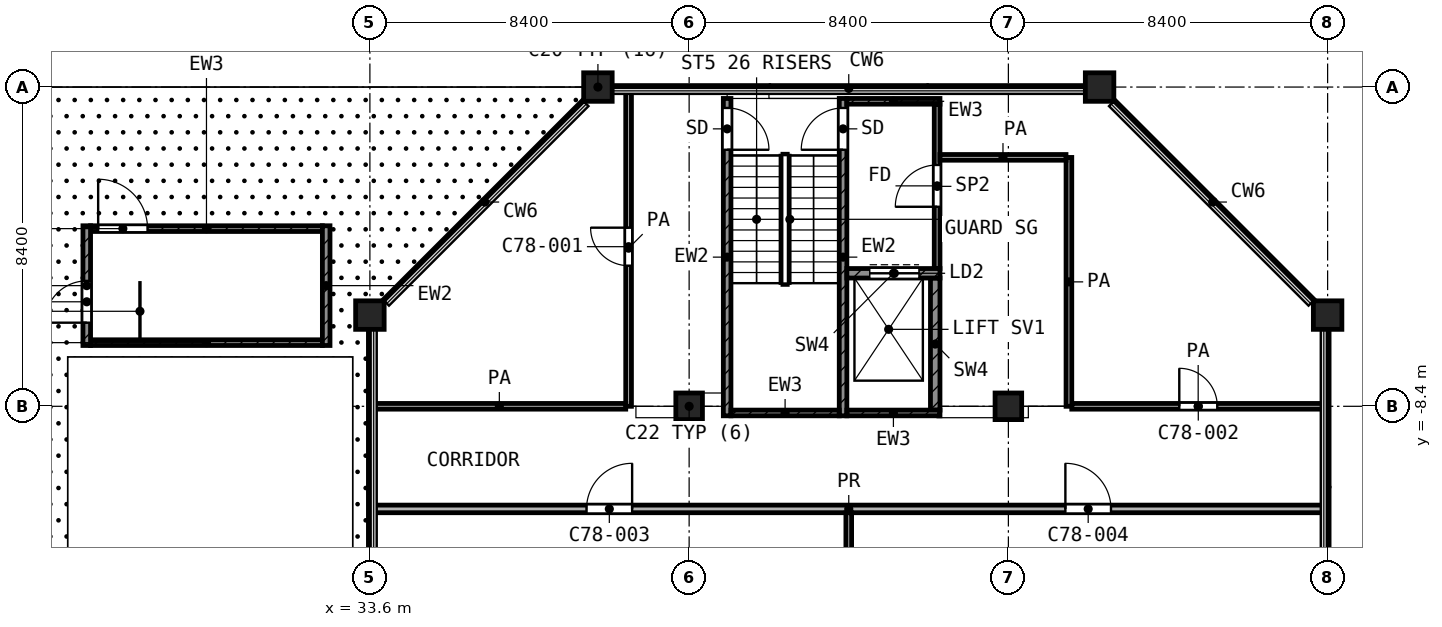
"""IFC4 building model, lengths in metres.
Left out: names, types, materials, properties, quantities, classifications, styles, units other than length and angle.
Written with IfcOpenShell. Run it as: python <this file> out.ifc"""

import sys

from ifc_helpers import new_model, si_unit, direction, frame, frame_2d, origin, origin_2d, place, context, subcontext, project, spatial, rectangle, extrude, element, fill, save


model = new_model("IFC4")
c1 = context("Model", 3, precision=1e-05, world=origin(), true_north=direction((0.0, 1.0)))
c2 = subcontext(c1, "Body", "Model", "MODEL_VIEW")
j1 = project(units=[si_unit("LENGTHUNIT", "METRE"), si_unit("PLANEANGLEUNIT", "RADIAN")], contexts=[c1])
p1 = place(None, origin())
s1 = spatial("IfcSite", under=j1, at=p1, CompositionType="ELEMENT")
p2 = place(p1, origin())
s2 = spatial("IfcBuilding", under=s1, at=p2, CompositionType="ELEMENT")
p3 = place(p2, frame((0.0, 0.0, 336.7)))
s3 = spatial("IfcBuildingStorey", under=s2, at=p3, CompositionType="ELEMENT", Elevation=336.7)
for number, where, z_axis, x_axis in (
    (1, (39.6, 0.0, 0.0), (0.0, 0.0, 1.0), (1.0, 0.0, 0.0)),
    (2, (52.8, 0.0, 0.0), (0.0, 0.0, 1.0), (1.0, 0.0, 0.0)),
    (3, (33.6, -6.0, 0.0), (0.0, 0.0, 1.0), (1.0, 0.0, 0.0)),
    (4, (58.8, -6.0, 0.0), (0.0, 0.0, 1.0), (1.0, 0.0, 0.0)),
):
    element("IfcColumn", number, at=place(p3, frame(where, z_axis=z_axis, x_axis=x_axis)), inside=s3, PredefinedType="COLUMN", context=c2, shape_type="SweptSolid", body=[
        extrude(rectangle(XDim=0.75, YDim=0.75, at=origin_2d()), origin(), (0.0, 0.0, 1.0), 4.5),
    ])
for number, where, z_axis, x_axis in (
    (5, (42.0, -8.4, 0.0), (0.0, 0.0, 1.0), (1.0, 0.0, 0.0)),
    (6, (50.4, -8.4, 0.0), (0.0, 0.0, 1.0), (1.0, 0.0, 0.0)),
):
    element("IfcColumn", number, at=place(p3, frame(where, z_axis=z_axis, x_axis=x_axis)), inside=s3, PredefinedType="COLUMN", context=c2, shape_type="SweptSolid", body=[
        extrude(rectangle(XDim=0.7, YDim=0.7, at=origin_2d()), origin(), (0.0, 0.0, 1.0), 4.5),
    ])
p4 = place(p3, frame((43.0, -8.65, 0.0), z_axis=(0.0, 0.0, 1.0), x_axis=(0.0, 1.0, 0.0)))
e7 = element("IfcWall", 7, at=p4, inside=s3, PredefinedType="SHEAR", context=c2, shape_type="SweptSolid", body=[
    extrude(rectangle(XDim=8.35, YDim=0.2, at=frame_2d((4.175, 0.0))), origin(), (0.0, 0.0, 1.0), 4.2),
])
p5 = place(p4, frame((7.0, 0.0, 0.0)))
e8 = element("IfcOpeningElement", 8, at=p5, cuts=e7, PredefinedType="OPENING", context=c2, shape_type="SweptSolid", body=[
    extrude(rectangle(XDim=1.1, YDim=2.1, at=frame_2d((0.55, 1.05))), frame((0.0, 0.11, 0.0), z_axis=(0.0, -1.0, 0.0), x_axis=(1.0, 0.0, 0.0)), (0.0, 0.0, 1.0), 0.22),
])
p6 = place(p3, frame((46.05, -8.65, 0.0), z_axis=(0.0, 0.0, 1.0), x_axis=(0.0, 1.0, 0.0)))
e9 = element("IfcWall", 9, at=p6, inside=s3, PredefinedType="SHEAR", context=c2, shape_type="SweptSolid", body=[
    extrude(rectangle(XDim=8.35, YDim=0.2, at=frame_2d((4.175, 0.0))), origin(), (0.0, 0.0, 1.0), 4.2),
])
p7 = place(p6, frame((7.0, 0.0, 0.0)))
e10 = element("IfcOpeningElement", 10, at=p7, cuts=e9, PredefinedType="OPENING", context=c2, shape_type="SweptSolid", body=[
    extrude(rectangle(XDim=1.1, YDim=2.1, at=frame_2d((0.55, 1.05))), frame((0.0, 0.11, 0.0), z_axis=(0.0, -1.0, 0.0), x_axis=(1.0, 0.0, 0.0)), (0.0, 0.0, 1.0), 0.22),
])
p8 = place(p3, frame((46.15, -0.375, 0.0), z_axis=(0.0, 0.0, 1.0), x_axis=(1.0, 0.0, 0.0)))
e11 = element("IfcWall", 11, at=p8, inside=s3, PredefinedType="SHEAR", context=c2, shape_type="SweptSolid", body=[
    extrude(rectangle(XDim=2.45, YDim=0.15, at=frame_2d((1.225, 0.0))), origin(), (0.0, 0.0, 1.0), 4.2),
])
p9 = place(p3, frame((43.1, -8.575, 0.0), z_axis=(0.0, 0.0, 1.0), x_axis=(1.0, 0.0, 0.0)))
e12 = element("IfcWall", 12, at=p9, inside=s3, PredefinedType="SHEAR", context=c2, shape_type="SweptSolid", body=[
    extrude(rectangle(XDim=2.85, YDim=0.15, at=frame_2d((1.425, 0.0))), origin(), (0.0, 0.0, 1.0), 4.2),
])
p10 = place(p3, frame((46.15, -8.575, 0.0), z_axis=(0.0, 0.0, 1.0), x_axis=(1.0, 0.0, 0.0)))
e13 = element("IfcWall", 13, at=p10, inside=s3, PredefinedType="SHEAR", context=c2, shape_type="SweptSolid", body=[
    extrude(rectangle(XDim=2.45, YDim=0.15, at=frame_2d((1.225, 0.0))), origin(), (0.0, 0.0, 1.0), 4.2),
])
p11 = place(p3, frame((46.15, -4.9, 0.0), z_axis=(0.0, 0.0, 1.0), x_axis=(1.0, 0.0, 0.0)))
e14 = element("IfcWall", 14, at=p11, inside=s3, PredefinedType="SHEAR", context=c2, shape_type="SweptSolid", body=[
    extrude(rectangle(XDim=2.45, YDim=0.25, at=frame_2d((1.225, 0.0))), origin(), (0.0, 0.0, 1.0), 4.2),
])
p12 = place(p11, frame((0.6, 0.0, 0.0)))
e15 = element("IfcOpeningElement", 15, at=p12, cuts=e14, PredefinedType="OPENING", context=c2, shape_type="SweptSolid", body=[
    extrude(rectangle(XDim=1.3, YDim=2.1, at=frame_2d((0.65, 1.05))), frame((0.0, 0.135, 0.0), z_axis=(0.0, -1.0, 0.0), x_axis=(1.0, 0.0, 0.0)), (0.0, 0.0, 1.0), 0.27),
])
p13 = place(p3, frame((48.475, -8.5, 0.0), z_axis=(0.0, 0.0, 1.0), x_axis=(0.0, 1.0, 0.0)))
e16 = element("IfcWall", 16, at=p13, inside=s3, PredefinedType="SHEAR", context=c2, shape_type="SweptSolid", body=[
    extrude(rectangle(XDim=3.475, YDim=0.25, at=frame_2d((1.738, 0.0))), origin(), (0.0, 0.0, 1.0), 4.2),
])
p14 = place(p3, frame((48.525, -4.775, 0.0), z_axis=(0.0, 0.0, 1.0), x_axis=(0.0, 1.0, 0.0)))
e17 = element("IfcWall", 17, at=p14, inside=s3, PredefinedType="PARTITIONING", context=c2, shape_type="SweptSolid", body=[
    extrude(rectangle(XDim=4.325, YDim=0.15, at=frame_2d((2.163, 0.0))), origin(), (0.0, 0.0, 1.0), 4.2),
])
p15 = place(p14, frame((1.625, 0.0, 0.0)))
e18 = element("IfcOpeningElement", 18, at=p15, cuts=e17, PredefinedType="OPENING", context=c2, shape_type="SweptSolid", body=[
    extrude(rectangle(XDim=1.1, YDim=2.1, at=frame_2d((0.55, 1.05))), frame((0.0, 0.085, 0.0), z_axis=(0.0, -1.0, 0.0), x_axis=(1.0, 0.0, 0.0)), (0.0, 0.0, 1.0), 0.17),
])
p16 = place(p3, frame((26.15, -6.8, 0.0), z_axis=(0.0, 0.0, 1.0), x_axis=(0.0, 1.0, 0.0)))
e19 = element("IfcWall", 19, at=p16, inside=s3, PredefinedType="SHEAR", context=c2, shape_type="SweptSolid", body=[
    extrude(rectangle(XDim=3.15, YDim=0.2, at=frame_2d((1.575, 0.0))), origin(), (0.0, 0.0, 1.0), 4.2),
])
p17 = place(p16, frame((0.6, 0.0, 0.0)))
e20 = element("IfcOpeningElement", 20, at=p17, cuts=e19, PredefinedType="OPENING", context=c2, shape_type="SweptSolid", body=[
    extrude(rectangle(XDim=1.1, YDim=2.1, at=frame_2d((0.55, 1.05))), frame((0.0, 0.11, 0.0), z_axis=(0.0, -1.0, 0.0), x_axis=(1.0, 0.0, 0.0)), (0.0, 0.0, 1.0), 0.22),
])
p18 = place(p3, frame((32.45, -6.8, 0.0), z_axis=(0.0, 0.0, 1.0), x_axis=(0.0, 1.0, 0.0)))
e21 = element("IfcWall", 21, at=p18, inside=s3, PredefinedType="SHEAR", context=c2, shape_type="SweptSolid", body=[
    extrude(rectangle(XDim=3.15, YDim=0.2, at=frame_2d((1.575, 0.0))), origin(), (0.0, 0.0, 1.0), 4.2),
])
p19 = place(p3, frame((26.25, -3.725, 0.0), z_axis=(0.0, 0.0, 1.0), x_axis=(1.0, 0.0, 0.0)))
e22 = element("IfcWall", 22, at=p19, inside=s3, PredefinedType="SHEAR", context=c2, shape_type="SweptSolid", body=[
    extrude(rectangle(XDim=6.1, YDim=0.15, at=frame_2d((3.05, 0.0))), origin(), (0.0, 0.0, 1.0), 4.2),
])
p20 = place(p19, frame((0.2, 0.0, 0.0)))
e23 = element("IfcOpeningElement", 23, at=p20, cuts=e22, PredefinedType="OPENING", context=c2, shape_type="SweptSolid", body=[
    extrude(rectangle(XDim=1.3, YDim=2.1, at=frame_2d((0.65, 1.05))), frame((0.0, 0.085, 0.0), z_axis=(0.0, -1.0, 0.0), x_axis=(1.0, 0.0, 0.0)), (0.0, 0.0, 1.0), 0.17),
])
p21 = place(p3, frame((26.25, -6.725, 0.0), z_axis=(0.0, 0.0, 1.0), x_axis=(1.0, 0.0, 0.0)))
e24 = element("IfcWall", 24, at=p21, inside=s3, PredefinedType="SHEAR", context=c2, shape_type="SweptSolid", body=[
    extrude(rectangle(XDim=6.1, YDim=0.15, at=frame_2d((3.05, 0.0))), origin(), (0.0, 0.0, 1.0), 4.2),
])
p22 = place(p3, frame((33.68, -8.4, 0.0), z_axis=(0.0, 0.0, 1.0), x_axis=(1.0, 0.0, 0.0)))
e25 = element("IfcWall", 25, at=p22, inside=s3, PredefinedType="PARTITIONING", context=c2, shape_type="SweptSolid", body=[
    extrude(rectangle(XDim=6.652, YDim=0.15, at=frame_2d((3.326, 0.0))), origin(), (0.0, 0.0, 1.0), 4.2),
])
p23 = place(p3, frame((52.068, -8.4, 0.0), z_axis=(0.0, 0.0, 1.0), x_axis=(1.0, 0.0, 0.0)))
e26 = element("IfcWall", 26, at=p23, inside=s3, PredefinedType="PARTITIONING", context=c2, shape_type="SweptSolid", body=[
    extrude(rectangle(XDim=6.652, YDim=0.15, at=frame_2d((3.326, 0.0))), origin(), (0.0, 0.0, 1.0), 4.2),
])
p24 = place(p23, frame((2.829, 0.0, 0.0)))
e27 = element("IfcOpeningElement", 27, at=p24, cuts=e26, PredefinedType="OPENING", context=c2, shape_type="SweptSolid", body=[
    extrude(rectangle(XDim=1.0, YDim=2.1, at=frame_2d((0.5, 1.05))), frame((0.0, 0.085, 0.0), z_axis=(0.0, -1.0, 0.0), x_axis=(1.0, 0.0, 0.0)), (0.0, 0.0, 1.0), 0.17),
])
p25 = place(p3, frame((48.6, -1.85, 0.0), z_axis=(0.0, 0.0, 1.0), x_axis=(1.0, 0.0, 0.0)))
e28 = element("IfcWall", 28, at=p25, inside=s3, PredefinedType="PARTITIONING", context=c2, shape_type="SweptSolid", body=[
    extrude(rectangle(XDim=3.316, YDim=0.15, at=frame_2d((1.658, 0.0))), origin(), (0.0, 0.0, 1.0), 4.2),
])
p26 = place(p3, frame((40.407, -8.4, 0.0), z_axis=(0.0, 0.0, 1.0), x_axis=(0.0, 1.0, 0.0)))
e29 = element("IfcWall", 29, at=p26, inside=s3, PredefinedType="PARTITIONING", context=c2, shape_type="SweptSolid", body=[
    extrude(rectangle(XDim=8.32, YDim=0.15, at=frame_2d((4.16, 0.0))), origin(), (0.0, 0.0, 1.0), 4.2),
])
p27 = place(p26, frame((3.7, 0.0, 0.0)))
e30 = element("IfcOpeningElement", 30, at=p27, cuts=e29, PredefinedType="OPENING", context=c2, shape_type="SweptSolid", body=[
    extrude(rectangle(XDim=1.0, YDim=2.1, at=frame_2d((0.5, 1.05))), frame((0.0, 0.085, 0.0), z_axis=(0.0, -1.0, 0.0), x_axis=(1.0, 0.0, 0.0)), (0.0, 0.0, 1.0), 0.17),
])
p28 = place(p3, frame((46.2, -16.549, 0.0), z_axis=(0.0, 0.0, 1.0), x_axis=(0.0, 1.0, 0.0)))
e31 = element("IfcWall", 31, at=p28, inside=s3, PredefinedType="PARTITIONING", context=c2, shape_type="SweptSolid", body=[
    extrude(rectangle(XDim=5.349, YDim=0.15, at=frame_2d((2.675, 0.0))), origin(), (0.0, 0.0, 1.0), 4.2),
])
p29 = place(p3, frame((51.993, -8.4, 0.0), z_axis=(0.0, 0.0, 1.0), x_axis=(0.0, 1.0, 0.0)))
e32 = element("IfcWall", 32, at=p29, inside=s3, PredefinedType="PARTITIONING", context=c2, shape_type="SweptSolid", body=[
    extrude(rectangle(XDim=6.548, YDim=0.15, at=frame_2d((3.274, 0.0))), origin(), (0.0, 0.0, 1.0), 4.2),
])
p30 = place(p3, frame((33.68, -11.1, 0.0), z_axis=(0.0, 0.0, 1.0), x_axis=(1.0, 0.0, 0.0)))
e33 = element("IfcWall", 33, at=p30, inside=s3, PredefinedType="PARTITIONING", context=c2, shape_type="SweptSolid", body=[
    extrude(rectangle(XDim=25.04, YDim=0.2, at=frame_2d((12.52, 0.0))), origin(), (0.0, 0.0, 1.0), 4.2),
])
p31 = place(p30, frame((5.62, 0.0, 0.0)))
e34 = element("IfcOpeningElement", 34, at=p31, cuts=e33, PredefinedType="OPENING", context=c2, shape_type="SweptSolid", body=[
    extrude(rectangle(XDim=1.2, YDim=2.1, at=frame_2d((0.6, 1.05))), frame((0.0, 0.11, 0.0), z_axis=(0.0, -1.0, 0.0), x_axis=(1.0, 0.0, 0.0)), (0.0, 0.0, 1.0), 0.22),
])
p32 = place(p30, frame((18.22, 0.0, 0.0)))
e35 = element("IfcOpeningElement", 35, at=p32, cuts=e33, PredefinedType="OPENING", context=c2, shape_type="SweptSolid", body=[
    extrude(rectangle(XDim=1.2, YDim=2.1, at=frame_2d((0.6, 1.05))), frame((0.0, 0.11, 0.0), z_axis=(0.0, -1.0, 0.0), x_axis=(1.0, 0.0, 0.0)), (0.0, 0.0, 1.0), 0.22),
])
p33 = place(p5, frame((1.1, 0.0, 0.0), z_axis=(0.0, 0.0, 1.0), x_axis=(-1.0, 0.0, 0.0)))
e36 = element("IfcDoor", 36, at=p33, inside=s3, OperationType="SINGLE_SWING_LEFT", PredefinedType="DOOR", context=c2, shape_type="SweptSolid", body=[
    extrude(rectangle(XDim=1.1, YDim=2.1, at=frame_2d((0.55, 1.05))), frame((0.0, 0.025, 0.0), z_axis=(0.0, -1.0, 0.0), x_axis=(1.0, 0.0, 0.0)), (0.0, 0.0, 1.0), 0.05),
])
fill(e8, e36)
p34 = place(p7, origin())
e37 = element("IfcDoor", 37, at=p34, inside=s3, OperationType="SINGLE_SWING_LEFT", PredefinedType="DOOR", context=c2, shape_type="SweptSolid", body=[
    extrude(rectangle(XDim=1.1, YDim=2.1, at=frame_2d((0.55, 1.05))), frame((0.0, 0.025, 0.0), z_axis=(0.0, -1.0, 0.0), x_axis=(1.0, 0.0, 0.0)), (0.0, 0.0, 1.0), 0.05),
])
fill(e10, e37)
p35 = place(p12, origin())
e38 = element("IfcDoor", 38, at=p35, inside=s3, OperationType="DOUBLE_DOOR_SLIDING", PredefinedType="DOOR", context=c2, shape_type="SweptSolid", body=[
    extrude(rectangle(XDim=1.3, YDim=2.1, at=frame_2d((0.65, 1.05))), frame((0.0, 0.025, 0.0), z_axis=(0.0, -1.0, 0.0), x_axis=(1.0, 0.0, 0.0)), (0.0, 0.0, 1.0), 0.05),
])
fill(e15, e38)
p36 = place(p15, origin())
e39 = element("IfcDoor", 39, at=p36, inside=s3, OperationType="SINGLE_SWING_LEFT", PredefinedType="DOOR", context=c2, shape_type="SweptSolid", body=[
    extrude(rectangle(XDim=1.1, YDim=2.1, at=frame_2d((0.55, 1.05))), frame((0.0, 0.025, 0.0), z_axis=(0.0, -1.0, 0.0), x_axis=(1.0, 0.0, 0.0)), (0.0, 0.0, 1.0), 0.05),
])
fill(e18, e39)
p37 = place(p17, origin())
e40 = element("IfcDoor", 40, at=p37, inside=s3, OperationType="SINGLE_SWING_LEFT", PredefinedType="DOOR", context=c2, shape_type="SweptSolid", body=[
    extrude(rectangle(XDim=1.1, YDim=2.1, at=frame_2d((0.55, 1.05))), frame((0.0, 0.025, 0.0), z_axis=(0.0, -1.0, 0.0), x_axis=(1.0, 0.0, 0.0)), (0.0, 0.0, 1.0), 0.05),
])
fill(e20, e40)
p38 = place(p20, origin())
e41 = element("IfcDoor", 41, at=p38, inside=s3, OperationType="SINGLE_SWING_LEFT", PredefinedType="DOOR", context=c2, shape_type="SweptSolid", body=[
    extrude(rectangle(XDim=1.3, YDim=2.1, at=frame_2d((0.65, 1.05))), frame((0.0, 0.025, 0.0), z_axis=(0.0, -1.0, 0.0), x_axis=(1.0, 0.0, 0.0)), (0.0, 0.0, 1.0), 0.05),
])
fill(e23, e41)
p39 = place(p31, origin())
e42 = element("IfcDoor", 42, at=p39, inside=s3, OperationType="SINGLE_SWING_RIGHT", PredefinedType="DOOR", context=c2, shape_type="SweptSolid", body=[
    extrude(rectangle(XDim=1.2, YDim=2.1, at=frame_2d((0.6, 1.05))), frame((0.0, 0.025, 0.0), z_axis=(0.0, -1.0, 0.0), x_axis=(1.0, 0.0, 0.0)), (0.0, 0.0, 1.0), 0.05),
])
fill(e34, e42)
p40 = place(p32, origin())
e43 = element("IfcDoor", 43, at=p40, inside=s3, OperationType="SINGLE_SWING_LEFT", PredefinedType="DOOR", context=c2, shape_type="SweptSolid", body=[
    extrude(rectangle(XDim=1.2, YDim=2.1, at=frame_2d((0.6, 1.05))), frame((0.0, 0.025, 0.0), z_axis=(0.0, -1.0, 0.0), x_axis=(1.0, 0.0, 0.0)), (0.0, 0.0, 1.0), 0.05),
])
fill(e35, e43)
p41 = place(p27, origin())
e44 = element("IfcDoor", 44, at=p41, inside=s3, OperationType="SINGLE_SWING_RIGHT", PredefinedType="DOOR", context=c2, shape_type="SweptSolid", body=[
    extrude(rectangle(XDim=1.0, YDim=2.1, at=frame_2d((0.5, 1.05))), frame((0.0, 0.025, 0.0), z_axis=(0.0, -1.0, 0.0), x_axis=(1.0, 0.0, 0.0)), (0.0, 0.0, 1.0), 0.05),
])
fill(e30, e44)
p42 = place(p24, origin())
e45 = element("IfcDoor", 45, at=p42, inside=s3, OperationType="SINGLE_SWING_LEFT", PredefinedType="DOOR", context=c2, shape_type="SweptSolid", body=[
    extrude(rectangle(XDim=1.0, YDim=2.1, at=frame_2d((0.5, 1.05))), frame((0.0, 0.025, 0.0), z_axis=(0.0, -1.0, 0.0), x_axis=(1.0, 0.0, 0.0)), (0.0, 0.0, 1.0), 0.05),
])
fill(e27, e45)
save(model, sys.argv[1])
